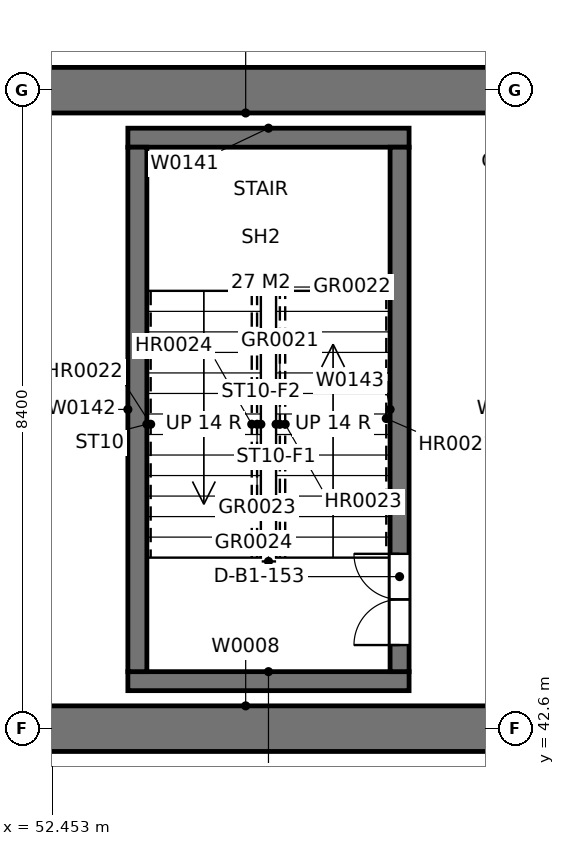
"""IFC4 building model, lengths in metres.
Left out: names, types, materials, properties, quantities, classifications, styles, units other than length and angle.
Written with IfcOpenShell. Run it as: python <this file> out.ifc"""

import sys

from ifc_helpers import new_model, si_unit, direction, frame, frame_2d, origin, place, context, subcontext, project, spatial, rectangle, extrude, element, fill, save


model = new_model("IFC4")
c1 = context("Model", 3, precision=1e-05, world=origin(), true_north=direction((0.0, 1.0)))
c2 = subcontext(c1, "Body", "Model", "MODEL_VIEW")
j1 = project(units=[si_unit("LENGTHUNIT", "METRE"), si_unit("PLANEANGLEUNIT", "RADIAN")], contexts=[c1])
p1 = place(None, origin())
s1 = spatial("IfcSite", under=j1, at=p1, CompositionType="ELEMENT")
p2 = place(p1, origin())
s2 = spatial("IfcBuilding", under=s1, at=p2, CompositionType="ELEMENT")
p3 = place(p2, frame((0.0, 0.0, -5.0)))
s3 = spatial("IfcBuildingStorey", under=s2, at=p3, CompositionType="ELEMENT", Elevation=-5.0)
for number, where, z_axis, x_axis in (
    (1, (51.3, 42.6, 0.0), (0.0, 0.0, 1.0), (1.0, 0.0, 0.0)),
    (2, (58.7, 51.0, 0.0), (0.0, 0.0, 1.0), (-1.0, 0.0, 0.0)),
):
    element("IfcWall", number, at=place(p3, frame(where, z_axis=z_axis, x_axis=x_axis)), inside=s3, PredefinedType="SOLIDWALL", context=c2, shape_type="SweptSolid", body=[
        extrude(rectangle(XDim=7.4, YDim=0.6, at=frame_2d((3.7, 0.0))), origin(), (0.0, 0.0, 1.0), 5.0),
    ])
for number, where, z_axis, x_axis in (
    (3, (53.45, 43.225, 0.0), (0.0, 0.0, 1.0), (1.0, 0.0, 0.0)),
    (4, (53.45, 50.375, 0.0), (0.0, 0.0, 1.0), (1.0, 0.0, 0.0)),
):
    element("IfcWall", number, at=place(p3, frame(where, z_axis=z_axis, x_axis=x_axis)), inside=s3, PredefinedType="SOLIDWALL", context=c2, shape_type="SweptSolid", body=[
        extrude(rectangle(XDim=3.7, YDim=0.25, at=frame_2d((1.85, 0.0))), origin(), (0.0, 0.0, 1.0), 5.0),
    ])
p4 = place(p3, frame((53.575, 43.35, 0.0), z_axis=(0.0, 0.0, 1.0), x_axis=(0.0, 1.0, 0.0)))
e5 = element("IfcWall", 5, at=p4, inside=s3, PredefinedType="SOLIDWALL", context=c2, shape_type="SweptSolid", body=[
    extrude(rectangle(XDim=6.9, YDim=0.25, at=frame_2d((3.45, 0.0))), origin(), (0.0, 0.0, 1.0), 5.0),
])
p5 = place(p3, frame((57.025, 43.35, 0.0), z_axis=(0.0, 0.0, 1.0), x_axis=(0.0, 1.0, 0.0)))
e6 = element("IfcWall", 6, at=p5, inside=s3, PredefinedType="SOLIDWALL", context=c2, shape_type="SweptSolid", body=[
    extrude(rectangle(XDim=6.9, YDim=0.25, at=frame_2d((3.45, 0.0))), origin(), (0.0, 0.0, 1.0), 5.0),
])
p6 = place(p5, frame((0.35, 0.0, 0.0)))
e7 = element("IfcOpeningElement", 7, at=p6, cuts=e6, PredefinedType="OPENING", context=c2, shape_type="SweptSolid", body=[
    extrude(rectangle(XDim=1.2, YDim=2.1, at=frame_2d((0.6, 1.05))), frame((0.0, 0.135, 0.0), z_axis=(0.0, -1.0, 0.0), x_axis=(1.0, 0.0, 0.0)), (0.0, 0.0, 1.0), 0.27),
])
p7 = place(p6, origin())
e8 = element("IfcDoor", 8, at=p7, inside=s3, OperationType="DOUBLE_DOOR_SINGLE_SWING", PredefinedType="DOOR", context=c2, shape_type="SweptSolid", body=[
    extrude(rectangle(XDim=1.2, YDim=2.1, at=frame_2d((0.6, 1.05))), frame((0.0, 0.025, 0.0), z_axis=(0.0, -1.0, 0.0), x_axis=(1.0, 0.0, 0.0)), (0.0, 0.0, 1.0), 0.05),
])
fill(e7, e8)
save(model, sys.argv[1])
